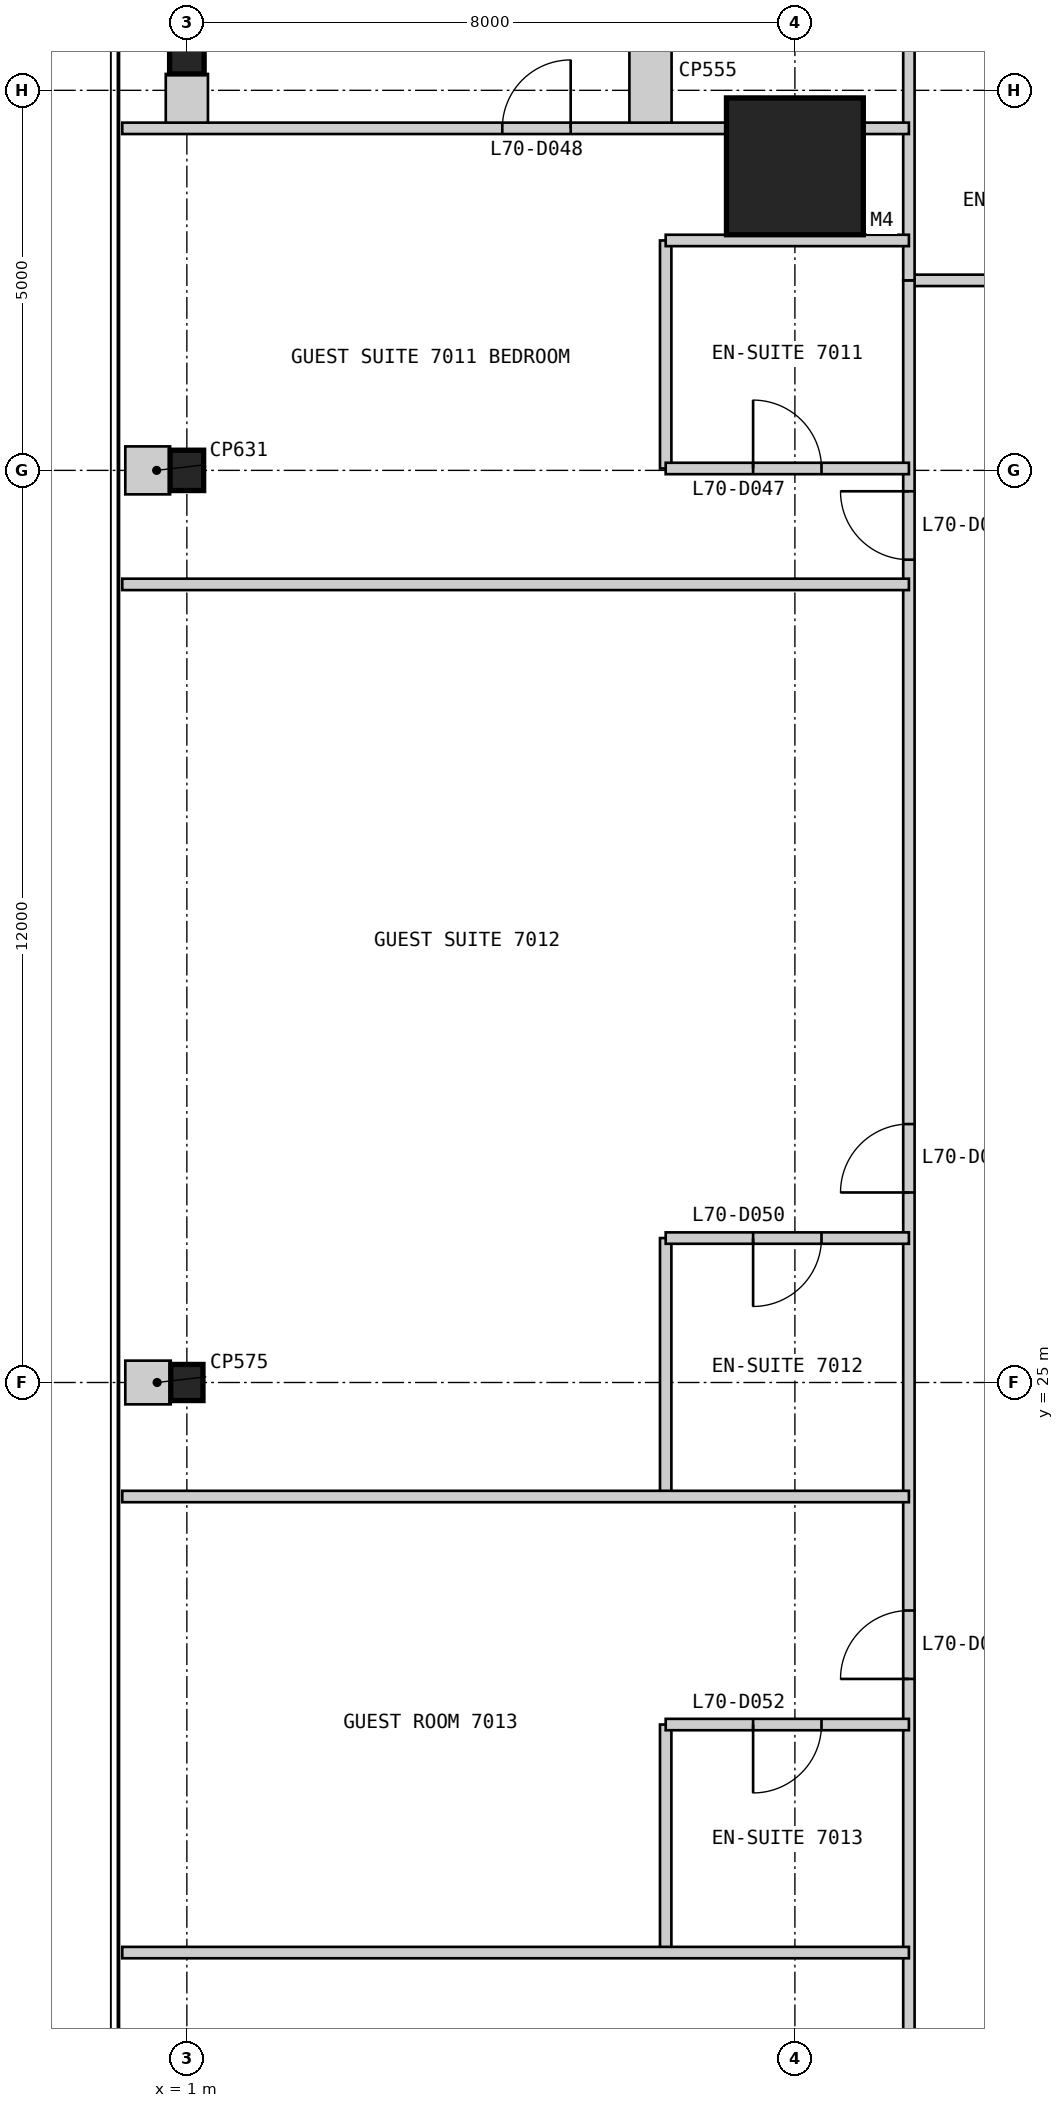
"""IFC4 building model, lengths in metres.
Left out: names, types, materials, properties, quantities, classifications, styles, units other than length and angle.
Written with IfcOpenShell. Run it as: python <this file> out.ifc"""

import sys

from ifc_helpers import new_model, si_unit, direction, frame, frame_2d, origin, origin_2d, place, context, subcontext, project, spatial, rectangle, i_section, extrude, element, fill, save


model = new_model("IFC4")
c1 = context("Model", 3, precision=1e-05, world=origin(), true_north=direction((0.0, 1.0)))
c2 = subcontext(c1, "Body", "Model", "MODEL_VIEW")
j1 = project(units=[si_unit("LENGTHUNIT", "METRE"), si_unit("PLANEANGLEUNIT", "RADIAN")], contexts=[c1])
p1 = place(None, origin())
s1 = spatial("IfcSite", under=j1, at=p1, CompositionType="ELEMENT")
p2 = place(p1, origin())
s2 = spatial("IfcBuilding", under=s1, at=p2, CompositionType="ELEMENT")
p3 = place(p2, frame((0.0, 0.0, 290.0)))
s3 = spatial("IfcBuildingStorey", under=s2, at=p3, CompositionType="ELEMENT", Elevation=290.0)
p4 = place(p3, frame((9.0, 41.0, 0.0), z_axis=(0.0, 0.0, 1.0), x_axis=(1.0, 0.0, 0.0)))
e1 = element("IfcColumn", 1, at=p4, inside=s3, PredefinedType="COLUMN", context=c2, shape_type="SweptSolid", body=[
    extrude(rectangle(XDim=1.8, YDim=1.8, at=origin_2d()), origin(), (0.0, 0.0, 1.0), 3.4),
])
p5 = place(p3, frame((1.0, 42.5, 0.0), z_axis=(0.0, 0.0, 1.0), x_axis=(1.0, 0.0, 0.0)))
e2 = element("IfcColumn", 2, at=p5, inside=s3, PredefinedType="COLUMN", context=c2, shape_type="SweptSolid", body=[
    extrude(i_section(OverallWidth=0.455, OverallDepth=0.569, WebThickness=0.078, FlangeThickness=0.125, at=origin_2d()), origin(), (0.0, 0.0, 1.0), 3.4),
])
p6 = place(p3, frame((1.0, 37.0, 0.0), z_axis=(0.0, 0.0, 1.0), x_axis=(1.0, 0.0, 0.0)))
e3 = element("IfcColumn", 3, at=p6, inside=s3, PredefinedType="COLUMN", context=c2, shape_type="SweptSolid", body=[
    extrude(i_section(OverallWidth=0.442, OverallDepth=0.531, WebThickness=0.066, FlangeThickness=0.106, at=origin_2d()), origin(), (0.0, 0.0, 1.0), 3.4),
])
p7 = place(p3, frame((1.0, 25.0, 0.0), z_axis=(0.0, 0.0, 1.0), x_axis=(1.0, 0.0, 0.0)))
e4 = element("IfcColumn", 4, at=p7, inside=s3, PredefinedType="COLUMN", context=c2, shape_type="SweptSolid", body=[
    extrude(i_section(OverallWidth=0.424, OverallDepth=0.475, WebThickness=0.048, FlangeThickness=0.077, at=origin_2d()), origin(), (0.0, 0.0, 1.0), 3.4),
])
p8 = place(p3, frame((39.5, 39.5, 0.0), z_axis=(0.0, 0.0, 1.0), x_axis=(-1.0, 0.0, 0.0)))
e5 = element("IfcWall", 5, at=p8, inside=s3, PredefinedType="PARTITIONING", context=c2, shape_type="SweptSolid", body=[
    extrude(rectangle(XDim=29.0, YDim=0.15, at=frame_2d((14.5, 0.0))), origin(), (0.0, 0.0, 1.0), 3.25),
])
p9 = place(p8, frame((1.85, 0.0, 0.0)))
e6 = element("IfcOpeningElement", 6, at=p9, cuts=e5, PredefinedType="OPENING", context=c2, shape_type="SweptSolid", body=[
    extrude(rectangle(XDim=0.9, YDim=2.1, at=frame_2d((0.45, 1.05))), frame((0.0, 0.085, 0.0), z_axis=(0.0, -1.0, 0.0), x_axis=(1.0, 0.0, 0.0)), (0.0, 0.0, 1.0), 0.17),
])
p10 = place(p8, frame((11.5, 0.0, 0.0)))
e7 = element("IfcOpeningElement", 7, at=p10, cuts=e5, PredefinedType="OPENING", context=c2, shape_type="SweptSolid", body=[
    extrude(rectangle(XDim=0.9, YDim=2.1, at=frame_2d((0.45, 1.05))), frame((0.0, 0.085, 0.0), z_axis=(0.0, -1.0, 0.0), x_axis=(1.0, 0.0, 0.0)), (0.0, 0.0, 1.0), 0.17),
])
p11 = place(p8, frame((24.1, 0.0, 0.0)))
e8 = element("IfcOpeningElement", 8, at=p11, cuts=e5, PredefinedType="OPENING", context=c2, shape_type="SweptSolid", body=[
    extrude(rectangle(XDim=0.9, YDim=2.1, at=frame_2d((0.45, 1.05))), frame((0.0, 0.085, 0.0), z_axis=(0.0, -1.0, 0.0), x_axis=(1.0, 0.0, 0.0)), (0.0, 0.0, 1.0), 0.17),
])
p12 = place(p3, frame((10.5, 39.5, 0.0), z_axis=(0.0, 0.0, 1.0), x_axis=(0.0, -1.0, 0.0)))
e9 = element("IfcWall", 9, at=p12, inside=s3, PredefinedType="PARTITIONING", context=c2, shape_type="SweptSolid", body=[
    extrude(rectangle(XDim=29.0, YDim=0.15, at=frame_2d((14.5, 0.0))), origin(), (0.0, 0.0, 1.0), 3.25),
])
p13 = place(p12, frame((2.775, 0.0, 0.0)))
e10 = element("IfcOpeningElement", 10, at=p13, cuts=e9, PredefinedType="OPENING", context=c2, shape_type="SweptSolid", body=[
    extrude(rectangle(XDim=0.9, YDim=2.1, at=frame_2d((0.45, 1.05))), frame((0.0, 0.085, 0.0), z_axis=(0.0, -1.0, 0.0), x_axis=(1.0, 0.0, 0.0)), (0.0, 0.0, 1.0), 0.17),
])
p14 = place(p12, frame((11.1, 0.0, 0.0)))
e11 = element("IfcOpeningElement", 11, at=p14, cuts=e9, PredefinedType="OPENING", context=c2, shape_type="SweptSolid", body=[
    extrude(rectangle(XDim=0.9, YDim=2.1, at=frame_2d((0.45, 1.05))), frame((0.0, 0.085, 0.0), z_axis=(0.0, -1.0, 0.0), x_axis=(1.0, 0.0, 0.0)), (0.0, 0.0, 1.0), 0.17),
])
p15 = place(p12, frame((17.5, 0.0, 0.0)))
e12 = element("IfcOpeningElement", 12, at=p15, cuts=e9, PredefinedType="OPENING", context=c2, shape_type="SweptSolid", body=[
    extrude(rectangle(XDim=0.9, YDim=2.1, at=frame_2d((0.45, 1.05))), frame((0.0, 0.085, 0.0), z_axis=(0.0, -1.0, 0.0), x_axis=(1.0, 0.0, 0.0)), (0.0, 0.0, 1.0), 0.17),
])
p16 = place(p12, frame((24.5, 0.0, 0.0)))
e13 = element("IfcOpeningElement", 13, at=p16, cuts=e9, PredefinedType="OPENING", context=c2, shape_type="SweptSolid", body=[
    extrude(rectangle(XDim=0.9, YDim=2.1, at=frame_2d((0.45, 1.05))), frame((0.0, 0.085, 0.0), z_axis=(0.0, -1.0, 0.0), x_axis=(1.0, 0.0, 0.0)), (0.0, 0.0, 1.0), 0.17),
])
p17 = place(p3, frame((10.5, 49.85, 0.0), z_axis=(0.0, 0.0, 1.0), x_axis=(0.0, -1.0, 0.0)))
e14 = element("IfcWall", 14, at=p17, inside=s3, PredefinedType="PARTITIONING", context=c2, shape_type="SweptSolid", body=[
    extrude(rectangle(XDim=10.35, YDim=0.15, at=frame_2d((5.175, 0.0))), origin(), (0.0, 0.0, 1.0), 3.25),
])
p18 = place(p3, frame((7.3, 40.025, 0.0), z_axis=(0.0, 0.0, 1.0), x_axis=(0.0, -1.0, 0.0)))
e15 = element("IfcWall", 15, at=p18, inside=s3, PredefinedType="PARTITIONING", context=c2, shape_type="SweptSolid", body=[
    extrude(rectangle(XDim=3.0, YDim=0.15, at=frame_2d((1.5, 0.0))), origin(), (0.0, 0.0, 1.0), 3.25),
])
p19 = place(p3, frame((7.3, 37.025, 0.0), z_axis=(0.0, 0.0, 1.0), x_axis=(1.0, 0.0, 0.0)))
e16 = element("IfcWall", 16, at=p19, inside=s3, PredefinedType="PARTITIONING", context=c2, shape_type="SweptSolid", body=[
    extrude(rectangle(XDim=3.2, YDim=0.15, at=frame_2d((1.6, 0.0))), origin(), (0.0, 0.0, 1.0), 2.404),
])
p20 = place(p19, frame((1.15, 0.0, 0.0)))
e17 = element("IfcOpeningElement", 17, at=p20, cuts=e16, PredefinedType="OPENING", context=c2, shape_type="SweptSolid", body=[
    extrude(rectangle(XDim=0.9, YDim=2.1, at=frame_2d((0.45, 1.05))), frame((0.0, 0.085, 0.0), z_axis=(0.0, -1.0, 0.0), x_axis=(1.0, 0.0, 0.0)), (0.0, 0.0, 1.0), 0.17),
])
p21 = place(p3, frame((7.3, 40.025, 0.0), z_axis=(0.0, 0.0, 1.0), x_axis=(1.0, 0.0, 0.0)))
e18 = element("IfcWall", 18, at=p21, inside=s3, PredefinedType="PARTITIONING", context=c2, shape_type="SweptSolid", body=[
    extrude(rectangle(XDim=3.2, YDim=0.15, at=frame_2d((1.6, 0.0))), origin(), (0.0, 0.0, 1.0), 3.25),
])
p22 = place(p3, frame((0.15, 41.5, 0.0), z_axis=(0.0, 0.0, 1.0), x_axis=(1.0, 0.0, 0.0)))
e19 = element("IfcWall", 19, at=p22, inside=s3, PredefinedType="PARTITIONING", context=c2, shape_type="SweptSolid", body=[
    extrude(rectangle(XDim=10.35, YDim=0.15, at=frame_2d((5.175, 0.0))), origin(), (0.0, 0.0, 1.0), 3.25),
])
p23 = place(p22, frame((5.0, 0.0, 0.0)))
e20 = element("IfcOpeningElement", 20, at=p23, cuts=e19, PredefinedType="OPENING", context=c2, shape_type="SweptSolid", body=[
    extrude(rectangle(XDim=0.9, YDim=2.1, at=frame_2d((0.45, 1.05))), frame((0.0, 0.085, 0.0), z_axis=(0.0, -1.0, 0.0), x_axis=(1.0, 0.0, 0.0)), (0.0, 0.0, 1.0), 0.17),
])
p24 = place(p3, frame((0.15, 35.5, 0.0), z_axis=(0.0, 0.0, 1.0), x_axis=(1.0, 0.0, 0.0)))
e21 = element("IfcWall", 21, at=p24, inside=s3, PredefinedType="PARTITIONING", context=c2, shape_type="SweptSolid", body=[
    extrude(rectangle(XDim=10.35, YDim=0.15, at=frame_2d((5.175, 0.0))), origin(), (0.0, 0.0, 1.0), 3.25),
])
p25 = place(p3, frame((7.3, 26.9, 0.0), z_axis=(0.0, 0.0, 1.0), x_axis=(0.0, -1.0, 0.0)))
e22 = element("IfcWall", 22, at=p25, inside=s3, PredefinedType="PARTITIONING", context=c2, shape_type="SweptSolid", body=[
    extrude(rectangle(XDim=3.4, YDim=0.15, at=frame_2d((1.7, 0.0))), origin(), (0.0, 0.0, 1.0), 3.25),
])
p26 = place(p3, frame((7.3, 26.9, 0.0), z_axis=(0.0, 0.0, 1.0), x_axis=(1.0, 0.0, 0.0)))
e23 = element("IfcWall", 23, at=p26, inside=s3, PredefinedType="PARTITIONING", context=c2, shape_type="SweptSolid", body=[
    extrude(rectangle(XDim=3.2, YDim=0.15, at=frame_2d((1.6, 0.0))), origin(), (0.0, 0.0, 1.0), 3.25),
])
p27 = place(p26, frame((1.15, 0.0, 0.0)))
e24 = element("IfcOpeningElement", 24, at=p27, cuts=e23, PredefinedType="OPENING", context=c2, shape_type="SweptSolid", body=[
    extrude(rectangle(XDim=0.9, YDim=2.1, at=frame_2d((0.45, 1.05))), frame((0.0, 0.085, 0.0), z_axis=(0.0, -1.0, 0.0), x_axis=(1.0, 0.0, 0.0)), (0.0, 0.0, 1.0), 0.17),
])
p28 = place(p3, frame((0.15, 23.5, 0.0), z_axis=(0.0, 0.0, 1.0), x_axis=(1.0, 0.0, 0.0)))
e25 = element("IfcWall", 25, at=p28, inside=s3, PredefinedType="PARTITIONING", context=c2, shape_type="SweptSolid", body=[
    extrude(rectangle(XDim=10.35, YDim=0.15, at=frame_2d((5.175, 0.0))), origin(), (0.0, 0.0, 1.0), 3.25),
])
p29 = place(p3, frame((7.3, 20.5, 0.0), z_axis=(0.0, 0.0, 1.0), x_axis=(0.0, -1.0, 0.0)))
e26 = element("IfcWall", 26, at=p29, inside=s3, PredefinedType="PARTITIONING", context=c2, shape_type="SweptSolid", body=[
    extrude(rectangle(XDim=3.0, YDim=0.15, at=frame_2d((1.5, 0.0))), origin(), (0.0, 0.0, 1.0), 3.25),
])
p30 = place(p3, frame((7.3, 20.5, 0.0), z_axis=(0.0, 0.0, 1.0), x_axis=(1.0, 0.0, 0.0)))
e27 = element("IfcWall", 27, at=p30, inside=s3, PredefinedType="PARTITIONING", context=c2, shape_type="SweptSolid", body=[
    extrude(rectangle(XDim=3.2, YDim=0.15, at=frame_2d((1.6, 0.0))), origin(), (0.0, 0.0, 1.0), 3.25),
])
p31 = place(p30, frame((1.15, 0.0, 0.0)))
e28 = element("IfcOpeningElement", 28, at=p31, cuts=e27, PredefinedType="OPENING", context=c2, shape_type="SweptSolid", body=[
    extrude(rectangle(XDim=0.9, YDim=2.1, at=frame_2d((0.45, 1.05))), frame((0.0, 0.085, 0.0), z_axis=(0.0, -1.0, 0.0), x_axis=(1.0, 0.0, 0.0)), (0.0, 0.0, 1.0), 0.17),
])
p32 = place(p3, frame((0.15, 17.5, 0.0), z_axis=(0.0, 0.0, 1.0), x_axis=(1.0, 0.0, 0.0)))
e29 = element("IfcWall", 29, at=p32, inside=s3, PredefinedType="PARTITIONING", context=c2, shape_type="SweptSolid", body=[
    extrude(rectangle(XDim=10.35, YDim=0.15, at=frame_2d((5.175, 0.0))), origin(), (0.0, 0.0, 1.0), 3.25),
])
p33 = place(p3, frame((7.1, 41.575, 0.0), z_axis=(0.0, 0.0, 1.0), x_axis=(0.0, 1.0, 0.0)))
e30 = element("IfcWall", 30, at=p33, inside=s3, PredefinedType="PARTITIONING", context=c2, shape_type="SweptSolid", body=[
    extrude(rectangle(XDim=1.041, YDim=0.555, at=frame_2d((0.52, 0.0))), origin(), (0.0, 0.0, 1.0), 3.25),
])
p34 = place(p3, frame((1.0, 41.575, 0.0), z_axis=(0.0, 0.0, 1.0), x_axis=(0.0, 1.0, 0.0)))
e31 = element("IfcWall", 31, at=p34, inside=s3, PredefinedType="PARTITIONING", context=c2, shape_type="SweptSolid", body=[
    extrude(rectangle(XDim=0.641, YDim=0.555, at=frame_2d((0.32, 0.0))), origin(), (0.0, 0.0, 1.0), 2.338),
])
p35 = place(p3, frame((0.19, 37.0, 0.0), z_axis=(0.0, 0.0, 1.0), x_axis=(1.0, 0.0, 0.0)))
e32 = element("IfcWall", 32, at=p35, inside=s3, PredefinedType="PARTITIONING", context=c2, shape_type="SweptSolid", body=[
    extrude(rectangle(XDim=0.589, YDim=0.631, at=frame_2d((0.294, 0.0))), origin(), (0.0, 0.0, 1.0), 3.25),
])
p36 = place(p3, frame((0.19, 25.0, 0.0), z_axis=(0.0, 0.0, 1.0), x_axis=(1.0, 0.0, 0.0)))
e33 = element("IfcWall", 33, at=p36, inside=s3, PredefinedType="PARTITIONING", context=c2, shape_type="SweptSolid", body=[
    extrude(rectangle(XDim=0.598, YDim=0.575, at=frame_2d((0.299, 0.0))), origin(), (0.0, 0.0, 1.0), 3.25),
])
p37 = place(p20, origin())
e34 = element("IfcDoor", 34, at=p37, inside=s3, OperationType="SINGLE_SWING_LEFT", PredefinedType="DOOR", context=c2, shape_type="SweptSolid", body=[
    extrude(rectangle(XDim=0.9, YDim=2.1, at=frame_2d((0.45, 1.05))), frame((0.0, 0.025, 0.0), z_axis=(0.0, -1.0, 0.0), x_axis=(1.0, 0.0, 0.0)), (0.0, 0.0, 1.0), 0.05),
])
fill(e17, e34)
p38 = place(p23, origin())
e35 = element("IfcDoor", 35, at=p38, inside=s3, OperationType="SINGLE_SWING_RIGHT", PredefinedType="DOOR", context=c2, shape_type="SweptSolid", body=[
    extrude(rectangle(XDim=0.9, YDim=2.1, at=frame_2d((0.45, 1.05))), frame((0.0, 0.025, 0.0), z_axis=(0.0, -1.0, 0.0), x_axis=(1.0, 0.0, 0.0)), (0.0, 0.0, 1.0), 0.05),
])
fill(e20, e35)
p39 = place(p13, frame((0.9, 0.0, 0.0), z_axis=(0.0, 0.0, 1.0), x_axis=(-1.0, 0.0, 0.0)))
e36 = element("IfcDoor", 36, at=p39, inside=s3, OperationType="SINGLE_SWING_RIGHT", PredefinedType="DOOR", context=c2, shape_type="SweptSolid", body=[
    extrude(rectangle(XDim=0.9, YDim=2.1, at=frame_2d((0.45, 1.05))), frame((0.0, 0.025, 0.0), z_axis=(0.0, -1.0, 0.0), x_axis=(1.0, 0.0, 0.0)), (0.0, 0.0, 1.0), 0.05),
])
fill(e10, e36)
p40 = place(p27, frame((0.9, 0.0, 0.0), z_axis=(0.0, 0.0, 1.0), x_axis=(-1.0, 0.0, 0.0)))
e37 = element("IfcDoor", 37, at=p40, inside=s3, OperationType="SINGLE_SWING_RIGHT", PredefinedType="DOOR", context=c2, shape_type="SweptSolid", body=[
    extrude(rectangle(XDim=0.9, YDim=2.1, at=frame_2d((0.45, 1.05))), frame((0.0, 0.025, 0.0), z_axis=(0.0, -1.0, 0.0), x_axis=(1.0, 0.0, 0.0)), (0.0, 0.0, 1.0), 0.05),
])
fill(e24, e37)
p41 = place(p14, frame((0.9, 0.0, 0.0), z_axis=(0.0, 0.0, 1.0), x_axis=(-1.0, 0.0, 0.0)))
e38 = element("IfcDoor", 38, at=p41, inside=s3, OperationType="SINGLE_SWING_LEFT", PredefinedType="DOOR", context=c2, shape_type="SweptSolid", body=[
    extrude(rectangle(XDim=0.9, YDim=2.1, at=frame_2d((0.45, 1.05))), frame((0.0, 0.025, 0.0), z_axis=(0.0, -1.0, 0.0), x_axis=(1.0, 0.0, 0.0)), (0.0, 0.0, 1.0), 0.05),
])
fill(e11, e38)
p42 = place(p31, frame((0.9, 0.0, 0.0), z_axis=(0.0, 0.0, 1.0), x_axis=(-1.0, 0.0, 0.0)))
e39 = element("IfcDoor", 39, at=p42, inside=s3, OperationType="SINGLE_SWING_RIGHT", PredefinedType="DOOR", context=c2, shape_type="SweptSolid", body=[
    extrude(rectangle(XDim=0.9, YDim=2.1, at=frame_2d((0.45, 1.05))), frame((0.0, 0.025, 0.0), z_axis=(0.0, -1.0, 0.0), x_axis=(1.0, 0.0, 0.0)), (0.0, 0.0, 1.0), 0.05),
])
fill(e28, e39)
p43 = place(p15, frame((0.9, 0.0, 0.0), z_axis=(0.0, 0.0, 1.0), x_axis=(-1.0, 0.0, 0.0)))
e40 = element("IfcDoor", 40, at=p43, inside=s3, OperationType="SINGLE_SWING_LEFT", PredefinedType="DOOR", context=c2, shape_type="SweptSolid", body=[
    extrude(rectangle(XDim=0.9, YDim=2.1, at=frame_2d((0.45, 1.05))), frame((0.0, 0.025, 0.0), z_axis=(0.0, -1.0, 0.0), x_axis=(1.0, 0.0, 0.0)), (0.0, 0.0, 1.0), 0.05),
])
fill(e12, e40)
save(model, sys.argv[1])
